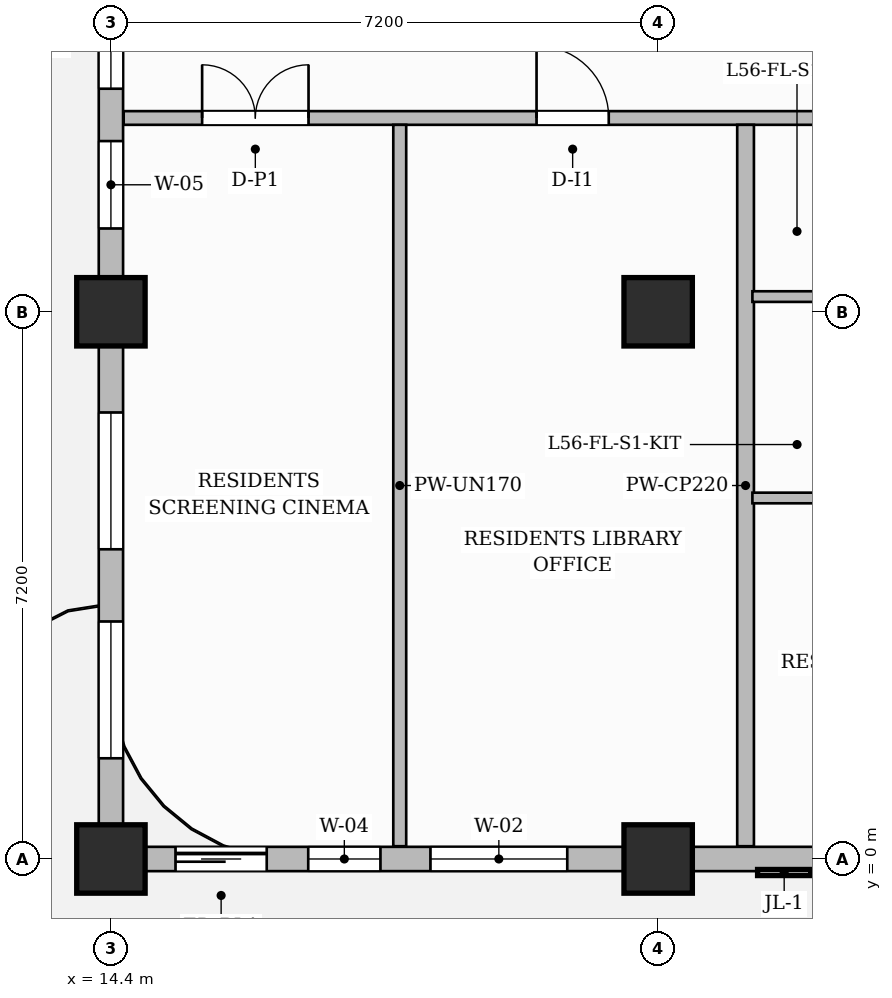
"""IFC4 building model, lengths in metres.
Left out: names, types, materials, properties, quantities, classifications, styles, units other than length and angle.
Written with IfcOpenShell. Run it as: python <this file> out.ifc"""

import sys

from ifc_helpers import new_model, si_unit, direction, frame, frame_2d, origin, origin_2d, place, context, subcontext, project, spatial, rectangle, extrude, source, transform, mapped, element, fill, save


model = new_model("IFC4")
c1 = context("Model", 3, precision=1e-05, world=origin(), true_north=direction((0.0, 1.0)))
c2 = subcontext(c1, "Body", "Model", "MODEL_VIEW")
j1 = project(units=[si_unit("LENGTHUNIT", "METRE"), si_unit("PLANEANGLEUNIT", "RADIAN")], contexts=[c1])
p1 = place(None, origin())
s1 = spatial("IfcSite", under=j1, at=p1, CompositionType="ELEMENT")
p2 = place(p1, origin())
s2 = spatial("IfcBuilding", under=s1, at=p2, CompositionType="ELEMENT")
p3 = place(p2, frame((0.0, 0.0, 225.0)))
s3 = spatial("IfcBuildingStorey", under=s2, at=p3, CompositionType="ELEMENT", Elevation=225.0)
m1 = source(origin(), c2, "Body", "SweptSolid", [
    extrude(rectangle(XDim=0.9, YDim=0.9, at=origin_2d()), origin(), (0.0, 0.0, 1.0), 3.85),
])
for number, where, z_axis, x_axis in (
    (1, (14.4, 0.0, 0.0), (0.0, 0.0, 1.0), (1.0, 0.0, 0.0)),
    (2, (14.4, 7.2, 0.0), (0.0, 0.0, 1.0), (1.0, 0.0, 0.0)),
    (3, (21.6, 0.0, 0.0), (0.0, 0.0, 1.0), (1.0, 0.0, 0.0)),
    (4, (21.6, 7.2, 0.0), (0.0, 0.0, 1.0), (1.0, 0.0, 0.0)),
):
    element("IfcColumn", number, at=place(p3, frame(where, z_axis=z_axis, x_axis=x_axis)), inside=s3, PredefinedType="COLUMN", context=c2, shape_type="MappedRepresentation", body=[
        mapped(m1, transform((0.0, 0.0, 0.0), scale=1.0)),
    ])
p4 = place(p3, frame((14.568, 9.75, 0.0), z_axis=(0.0, 0.0, 1.0), x_axis=(1.0, 0.0, 0.0)))
e5 = element("IfcWall", 5, at=p4, inside=s3, PredefinedType="PARTITIONING", context=c2, shape_type="SweptSolid", body=[
    extrude(rectangle(XDim=15.542, YDim=0.18, at=frame_2d((7.771, 0.0))), origin(), (0.0, 0.0, 1.0), 3.6),
])
p5 = place(p4, frame((1.032, 0.0, 0.0)))
e6 = element("IfcOpeningElement", 6, at=p5, cuts=e5, PredefinedType="OPENING", context=c2, shape_type="SweptSolid", body=[
    extrude(rectangle(XDim=1.4, YDim=2.35, at=frame_2d((0.7, 1.175))), frame((0.0, 0.1, 0.0), z_axis=(0.0, -1.0, 0.0), x_axis=(1.0, 0.0, 0.0)), (0.0, 0.0, 1.0), 0.2),
])
p6 = place(p4, frame((5.432, 0.0, 0.0)))
e7 = element("IfcOpeningElement", 7, at=p6, cuts=e5, PredefinedType="OPENING", context=c2, shape_type="SweptSolid", body=[
    extrude(rectangle(XDim=0.95, YDim=2.15, at=frame_2d((0.475, 1.075))), frame((0.0, 0.1, 0.0), z_axis=(0.0, -1.0, 0.0), x_axis=(1.0, 0.0, 0.0)), (0.0, 0.0, 1.0), 0.2),
])
p7 = place(p4, frame((10.787, 0.0, 0.0)))
e8 = element("IfcOpeningElement", 8, at=p7, cuts=e5, PredefinedType="OPENING", context=c2, shape_type="SweptSolid", body=[
    extrude(rectangle(XDim=1.05, YDim=2.25, at=frame_2d((0.525, 1.125))), frame((0.0, 0.1, 0.0), z_axis=(0.0, -1.0, 0.0), x_axis=(1.0, 0.0, 0.0)), (0.0, 0.0, 1.0), 0.2),
])
p8 = place(p3, frame((18.2, 0.168, 0.0), z_axis=(0.0, 0.0, 1.0), x_axis=(0.0, 1.0, 0.0)))
e9 = element("IfcWall", 9, at=p8, inside=s3, PredefinedType="PARTITIONING", context=c2, shape_type="SweptSolid", body=[
    extrude(rectangle(XDim=9.492, YDim=0.17, at=frame_2d((4.746, 0.0))), origin(), (0.0, 0.0, 1.0), 3.315),
])
p9 = place(p3, frame((22.75, 0.168, 0.0), z_axis=(0.0, 0.0, 1.0), x_axis=(0.0, 1.0, 0.0)))
e10 = element("IfcWall", 10, at=p9, inside=s3, PredefinedType="PARTITIONING", context=c2, shape_type="SweptSolid", body=[
    extrude(rectangle(XDim=9.492, YDim=0.22, at=frame_2d((4.746, 0.0))), origin(), (0.0, 0.0, 1.0), 3.6),
])
p10 = place(p3, frame((22.84, 7.4, 0.0), z_axis=(0.0, 0.0, 1.0), x_axis=(1.0, 0.0, 0.0)))
e11 = element("IfcWall", 11, at=p10, inside=s3, PredefinedType="PARTITIONING", context=c2, shape_type="SweptSolid", body=[
    extrude(rectangle(XDim=2.07, YDim=0.14, at=frame_2d((1.035, 0.0))), origin(), (0.0, 0.0, 1.0), 3.135),
])
p11 = place(p3, frame((22.84, 4.75, 0.0), z_axis=(0.0, 0.0, 1.0), x_axis=(1.0, 0.0, 0.0)))
e12 = element("IfcWall", 12, at=p11, inside=s3, PredefinedType="PARTITIONING", context=c2, shape_type="SweptSolid", body=[
    extrude(rectangle(XDim=2.07, YDim=0.14, at=frame_2d((1.035, 0.0))), origin(), (0.0, 0.0, 1.0), 3.6),
])
p12 = place(p3, frame((14.4, 0.0, 0.0), z_axis=(0.0, 0.0, 1.0), x_axis=(1.0, 0.0, 0.0)))
e13 = element("IfcWall", 13, at=p12, inside=s3, PredefinedType="SOLIDWALL", context=c2, shape_type="SweptSolid", body=[
    extrude(rectangle(XDim=35.4, YDim=0.32, at=frame_2d((17.7, 0.0))), origin(), (0.0, 0.0, 1.0), 3.135),
])
p13 = place(p12, frame((0.85, 0.0, 0.0)))
e14 = element("IfcOpeningElement", 14, at=p13, cuts=e13, PredefinedType="OPENING", context=c2, shape_type="SweptSolid", body=[
    extrude(rectangle(XDim=1.2, YDim=2.2, at=frame_2d((0.6, 1.1))), frame((0.0, 0.17, 0.0), z_axis=(0.0, -1.0, 0.0), x_axis=(1.0, 0.0, 0.0)), (0.0, 0.0, 1.0), 0.34),
])
p14 = place(p12, frame((2.596, 0.0, 0.8)))
e15 = element("IfcOpeningElement", 15, at=p14, cuts=e13, PredefinedType="OPENING", context=c2, shape_type="SweptSolid", body=[
    extrude(rectangle(XDim=0.95, YDim=1.75, at=frame_2d((0.475, 0.875))), frame((0.0, 0.17, 0.0), z_axis=(0.0, -1.0, 0.0), x_axis=(1.0, 0.0, 0.0)), (0.0, 0.0, 1.0), 0.34),
])
p15 = place(p12, frame((4.204, 0.0, 0.8)))
e16 = element("IfcOpeningElement", 16, at=p15, cuts=e13, PredefinedType="OPENING", context=c2, shape_type="SweptSolid", body=[
    extrude(rectangle(XDim=1.8, YDim=1.85, at=frame_2d((0.9, 0.925))), frame((0.0, 0.17, 0.0), z_axis=(0.0, -1.0, 0.0), x_axis=(1.0, 0.0, 0.0)), (0.0, 0.0, 1.0), 0.34),
])
p16 = place(p12, frame((9.415, 0.0, 0.8)))
e17 = element("IfcOpeningElement", 17, at=p16, cuts=e13, PredefinedType="OPENING", context=c2, shape_type="SweptSolid", body=[
    extrude(rectangle(XDim=1.8, YDim=1.85, at=frame_2d((0.9, 0.925))), frame((0.0, 0.17, 0.0), z_axis=(0.0, -1.0, 0.0), x_axis=(1.0, 0.0, 0.0)), (0.0, 0.0, 1.0), 0.34),
])
p17 = place(p12, frame((12.469, 0.0, 0.8)))
e18 = element("IfcOpeningElement", 18, at=p17, cuts=e13, PredefinedType="OPENING", context=c2, shape_type="SweptSolid", body=[
    extrude(rectangle(XDim=0.95, YDim=1.75, at=frame_2d((0.475, 0.875))), frame((0.0, 0.17, 0.0), z_axis=(0.0, -1.0, 0.0), x_axis=(1.0, 0.0, 0.0)), (0.0, 0.0, 1.0), 0.34),
])
p18 = place(p12, frame((16.804, 0.0, 0.8)))
e19 = element("IfcOpeningElement", 19, at=p18, cuts=e13, PredefinedType="OPENING", context=c2, shape_type="SweptSolid", body=[
    extrude(rectangle(XDim=1.8, YDim=1.85, at=frame_2d((0.9, 0.925))), frame((0.0, 0.17, 0.0), z_axis=(0.0, -1.0, 0.0), x_axis=(1.0, 0.0, 0.0)), (0.0, 0.0, 1.0), 0.34),
])
p19 = place(p12, frame((22.396, 0.0, 0.8)))
e20 = element("IfcOpeningElement", 20, at=p19, cuts=e13, PredefinedType="OPENING", context=c2, shape_type="SweptSolid", body=[
    extrude(rectangle(XDim=1.8, YDim=1.85, at=frame_2d((0.9, 0.925))), frame((0.0, 0.17, 0.0), z_axis=(0.0, -1.0, 0.0), x_axis=(1.0, 0.0, 0.0)), (0.0, 0.0, 1.0), 0.34),
])
p20 = place(p12, frame((25.629, 0.0, 0.8)))
e21 = element("IfcOpeningElement", 21, at=p20, cuts=e13, PredefinedType="OPENING", context=c2, shape_type="SweptSolid", body=[
    extrude(rectangle(XDim=0.95, YDim=1.75, at=frame_2d((0.475, 0.875))), frame((0.0, 0.17, 0.0), z_axis=(0.0, -1.0, 0.0), x_axis=(1.0, 0.0, 0.0)), (0.0, 0.0, 1.0), 0.34),
])
p21 = place(p12, frame((29.075, 0.0, 0.8)))
e22 = element("IfcOpeningElement", 22, at=p21, cuts=e13, PredefinedType="OPENING", context=c2, shape_type="SweptSolid", body=[
    extrude(rectangle(XDim=1.8, YDim=1.85, at=frame_2d((0.9, 0.925))), frame((0.0, 0.17, 0.0), z_axis=(0.0, -1.0, 0.0), x_axis=(1.0, 0.0, 0.0)), (0.0, 0.0, 1.0), 0.34),
])
p22 = place(p12, frame((32.125, 0.0, 0.8)))
e23 = element("IfcOpeningElement", 23, at=p22, cuts=e13, PredefinedType="OPENING", context=c2, shape_type="SweptSolid", body=[
    extrude(rectangle(XDim=1.8, YDim=1.85, at=frame_2d((0.9, 0.925))), frame((0.0, 0.17, 0.0), z_axis=(0.0, -1.0, 0.0), x_axis=(1.0, 0.0, 0.0)), (0.0, 0.0, 1.0), 0.34),
])
p23 = place(p3, frame((14.4, 0.05, 0.0), z_axis=(0.0, 0.0, 1.0), x_axis=(0.0, 1.0, 0.0)))
e24 = element("IfcWall", 24, at=p23, inside=s3, PredefinedType="SOLIDWALL", context=c2, shape_type="SweptSolid", body=[
    extrude(rectangle(XDim=21.5, YDim=0.32, at=frame_2d((10.75, 0.0))), origin(), (0.0, 0.0, 1.0), 3.135),
])
p24 = place(p23, frame((1.275, 0.0, 0.8)))
e25 = element("IfcOpeningElement", 25, at=p24, cuts=e24, PredefinedType="OPENING", context=c2, shape_type="SweptSolid", body=[
    extrude(rectangle(XDim=1.8, YDim=1.85, at=frame_2d((0.9, 0.925))), frame((0.0, 0.17, 0.0), z_axis=(0.0, -1.0, 0.0), x_axis=(1.0, 0.0, 0.0)), (0.0, 0.0, 1.0), 0.34),
])
p25 = place(p23, frame((4.025, 0.0, 0.8)))
e26 = element("IfcOpeningElement", 26, at=p25, cuts=e24, PredefinedType="OPENING", context=c2, shape_type="SweptSolid", body=[
    extrude(rectangle(XDim=1.8, YDim=1.85, at=frame_2d((0.9, 0.925))), frame((0.0, 0.17, 0.0), z_axis=(0.0, -1.0, 0.0), x_axis=(1.0, 0.0, 0.0)), (0.0, 0.0, 1.0), 0.34),
])
p26 = place(p23, frame((8.246, 0.0, 0.8)))
e27 = element("IfcOpeningElement", 27, at=p26, cuts=e24, PredefinedType="OPENING", context=c2, shape_type="SweptSolid", body=[
    extrude(rectangle(XDim=1.15, YDim=1.8, at=frame_2d((0.575, 0.9))), frame((0.0, 0.17, 0.0), z_axis=(0.0, -1.0, 0.0), x_axis=(1.0, 0.0, 0.0)), (0.0, 0.0, 1.0), 0.34),
])
p27 = place(p23, frame((10.085, 0.0, 0.8)))
e28 = element("IfcOpeningElement", 28, at=p27, cuts=e24, PredefinedType="OPENING", context=c2, shape_type="SweptSolid", body=[
    extrude(rectangle(XDim=1.15, YDim=1.8, at=frame_2d((0.575, 0.9))), frame((0.0, 0.17, 0.0), z_axis=(0.0, -1.0, 0.0), x_axis=(1.0, 0.0, 0.0)), (0.0, 0.0, 1.0), 0.34),
])
p28 = place(p23, frame((12.014, 0.0, 0.8)))
e29 = element("IfcOpeningElement", 29, at=p28, cuts=e24, PredefinedType="OPENING", context=c2, shape_type="SweptSolid", body=[
    extrude(rectangle(XDim=1.15, YDim=1.8, at=frame_2d((0.575, 0.9))), frame((0.0, 0.17, 0.0), z_axis=(0.0, -1.0, 0.0), x_axis=(1.0, 0.0, 0.0)), (0.0, 0.0, 1.0), 0.34),
])
p29 = place(p23, frame((15.406, 0.0, 0.8)))
e30 = element("IfcOpeningElement", 30, at=p29, cuts=e24, PredefinedType="OPENING", context=c2, shape_type="SweptSolid", body=[
    extrude(rectangle(XDim=0.95, YDim=1.75, at=frame_2d((0.475, 0.875))), frame((0.0, 0.17, 0.0), z_axis=(0.0, -1.0, 0.0), x_axis=(1.0, 0.0, 0.0)), (0.0, 0.0, 1.0), 0.34),
])
p30 = place(p23, frame((17.789, 0.0, 0.8)))
e31 = element("IfcOpeningElement", 31, at=p30, cuts=e24, PredefinedType="OPENING", context=c2, shape_type="SweptSolid", body=[
    extrude(rectangle(XDim=1.8, YDim=1.85, at=frame_2d((0.9, 0.925))), frame((0.0, 0.17, 0.0), z_axis=(0.0, -1.0, 0.0), x_axis=(1.0, 0.0, 0.0)), (0.0, 0.0, 1.0), 0.34),
])
m2 = source(origin(), c2, "Body", "SweptSolid", [
    extrude(rectangle(XDim=1.4, YDim=2.35, at=frame_2d((0.7, 1.175))), frame((0.0, 0.025, 0.0), z_axis=(0.0, -1.0, 0.0), x_axis=(1.0, 0.0, 0.0)), (0.0, 0.0, 1.0), 0.05),
])
p31 = place(p5, origin())
e32 = element("IfcDoor", 32, at=p31, inside=s3, OperationType="DOUBLE_DOOR_SINGLE_SWING", PredefinedType="DOOR", context=c2, shape_type="MappedRepresentation", body=[
    mapped(m2, transform((0.0, 0.0, 0.0), scale=1.0)),
])
fill(e6, e32)
m3 = source(origin(), c2, "Body", "SweptSolid", [
    extrude(rectangle(XDim=0.95, YDim=2.15, at=frame_2d((0.475, 1.075))), frame((0.0, 0.025, 0.0), z_axis=(0.0, -1.0, 0.0), x_axis=(1.0, 0.0, 0.0)), (0.0, 0.0, 1.0), 0.05),
])
p32 = place(p6, origin())
e33 = element("IfcDoor", 33, at=p32, inside=s3, OperationType="SINGLE_SWING_LEFT", PredefinedType="DOOR", context=c2, shape_type="MappedRepresentation", body=[
    mapped(m3, transform((0.0, 0.0, 0.0), scale=1.0)),
])
fill(e7, e33)
m4 = source(origin(), c2, "Body", "SweptSolid", [
    extrude(rectangle(XDim=1.2, YDim=2.2, at=frame_2d((0.6, 1.1))), frame((0.0, 0.025, 0.0), z_axis=(0.0, -1.0, 0.0), x_axis=(1.0, 0.0, 0.0)), (0.0, 0.0, 1.0), 0.05),
])
p33 = place(p13, origin())
e34 = element("IfcDoor", 34, at=p33, inside=s3, OperationType="SLIDING_TO_LEFT", PredefinedType="DOOR", context=c2, shape_type="MappedRepresentation", body=[
    mapped(m4, transform((0.0, 0.0, 0.0), scale=1.0)),
])
fill(e14, e34)
m5 = source(origin(), c2, "Body", "SweptSolid", [
    extrude(rectangle(XDim=0.95, YDim=1.75, at=frame_2d((0.475, 0.875))), frame((0.0, 0.03, 0.0), z_axis=(0.0, -1.0, 0.0), x_axis=(1.0, 0.0, 0.0)), (0.0, 0.0, 1.0), 0.06),
])
p34 = place(p14, origin())
e35 = element("IfcWindow", 35, at=p34, inside=s3, PartitioningType="SINGLE_PANEL", PredefinedType="WINDOW", context=c2, shape_type="MappedRepresentation", body=[
    mapped(m5, transform((0.0, 0.0, 0.0), scale=1.0)),
])
fill(e15, e35)
m6 = source(origin(), c2, "Body", "SweptSolid", [
    extrude(rectangle(XDim=1.8, YDim=1.85, at=frame_2d((0.9, 0.925))), frame((0.0, 0.03, 0.0), z_axis=(0.0, -1.0, 0.0), x_axis=(1.0, 0.0, 0.0)), (0.0, 0.0, 1.0), 0.06),
])
p35 = place(p15, origin())
e36 = element("IfcWindow", 36, at=p35, inside=s3, PartitioningType="DOUBLE_PANEL_VERTICAL", PredefinedType="WINDOW", context=c2, shape_type="MappedRepresentation", body=[
    mapped(m6, transform((0.0, 0.0, 0.0), scale=1.0)),
])
fill(e16, e36)
p36 = place(p24, origin())
e37 = element("IfcWindow", 37, at=p36, inside=s3, PartitioningType="DOUBLE_PANEL_VERTICAL", PredefinedType="WINDOW", context=c2, shape_type="MappedRepresentation", body=[
    mapped(m6, transform((0.0, 0.0, 0.0), scale=1.0)),
])
fill(e25, e37)
p37 = place(p25, origin())
e38 = element("IfcWindow", 38, at=p37, inside=s3, PartitioningType="DOUBLE_PANEL_VERTICAL", PredefinedType="WINDOW", context=c2, shape_type="MappedRepresentation", body=[
    mapped(m6, transform((0.0, 0.0, 0.0), scale=1.0)),
])
fill(e26, e38)
m7 = source(origin(), c2, "Body", "SweptSolid", [
    extrude(rectangle(XDim=1.15, YDim=1.8, at=frame_2d((0.575, 0.9))), frame((0.0, 0.03, 0.0), z_axis=(0.0, -1.0, 0.0), x_axis=(1.0, 0.0, 0.0)), (0.0, 0.0, 1.0), 0.06),
])
p38 = place(p26, origin())
e39 = element("IfcWindow", 39, at=p38, inside=s3, PartitioningType="SINGLE_PANEL", PredefinedType="WINDOW", context=c2, shape_type="MappedRepresentation", body=[
    mapped(m7, transform((0.0, 0.0, 0.0), scale=1.0)),
])
fill(e27, e39)
p39 = place(p27, origin())
e40 = element("IfcWindow", 40, at=p39, inside=s3, PartitioningType="SINGLE_PANEL", PredefinedType="WINDOW", context=c2, shape_type="MappedRepresentation", body=[
    mapped(m7, transform((0.0, 0.0, 0.0), scale=1.0)),
])
fill(e28, e40)
save(model, sys.argv[1])
